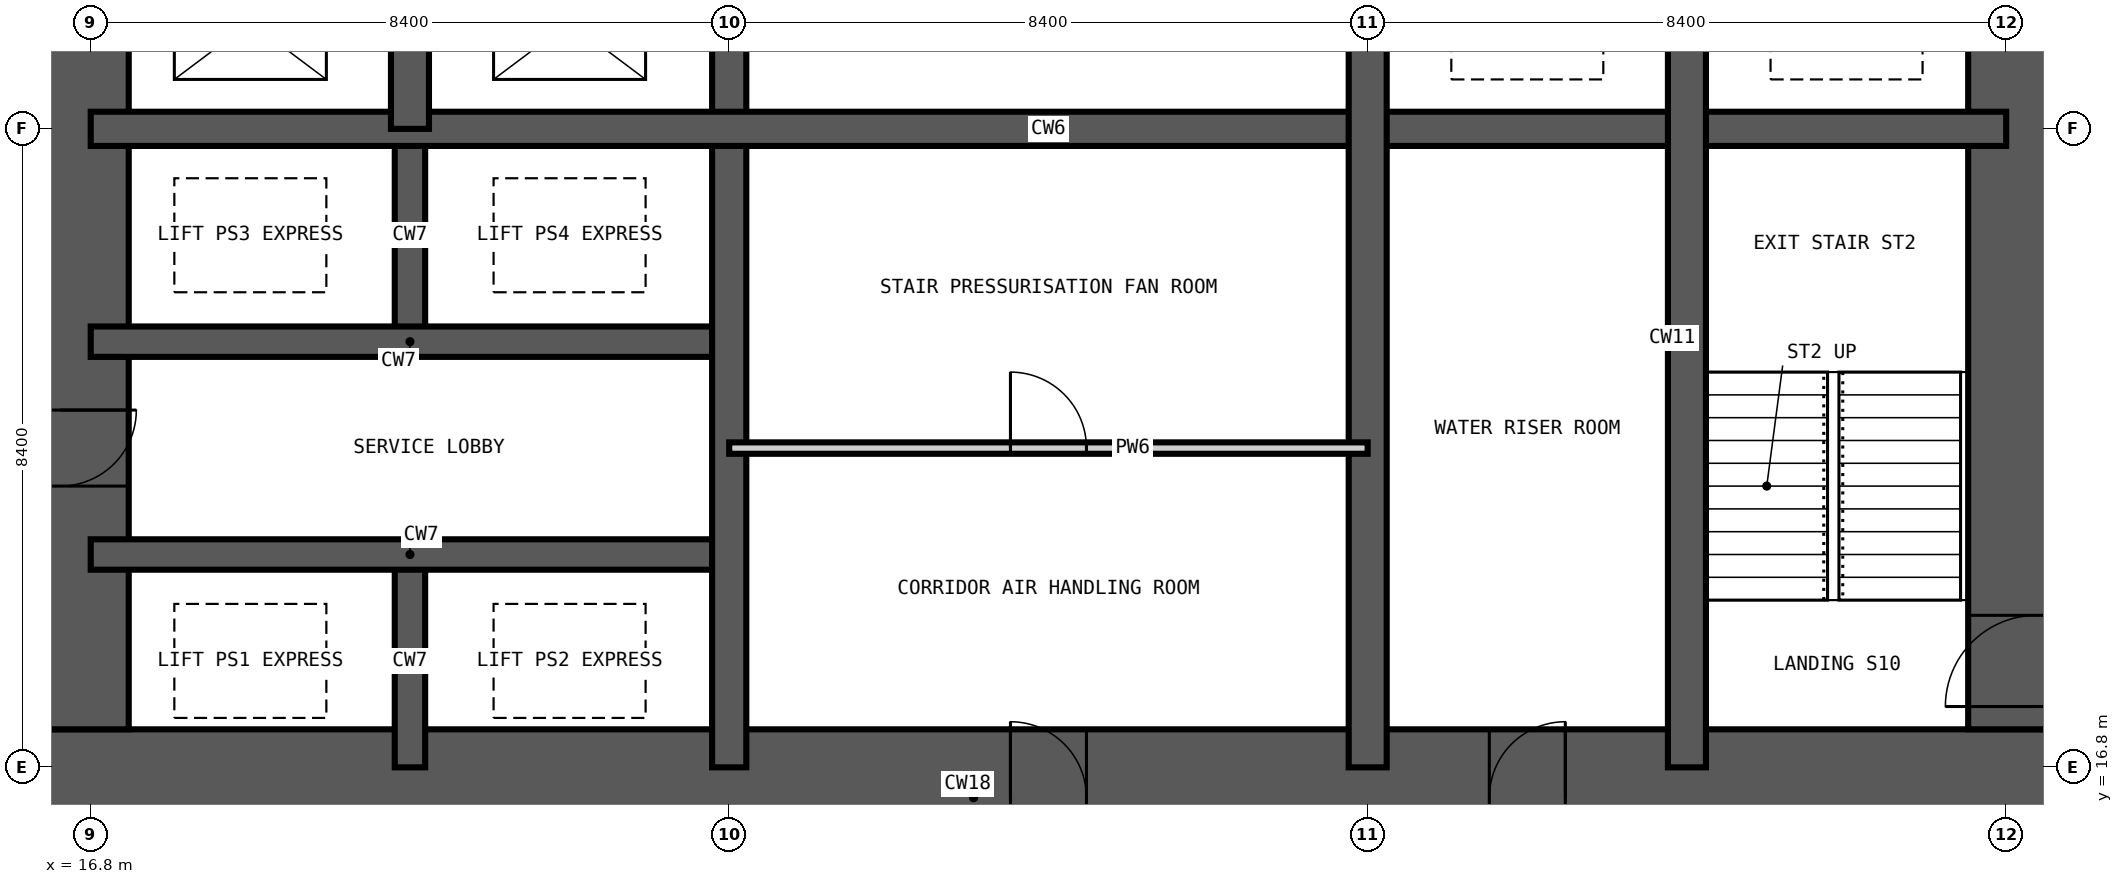
"""IFC4 building model, lengths in metres.
Left out: names, types, materials, properties, quantities, classifications, styles, units other than length and angle.
Written with IfcOpenShell. Run it as: python <this file> out.ifc"""

import sys

from ifc_helpers import new_model, si_unit, direction, frame, frame_2d, origin, place, context, subcontext, project, spatial, rectangle, extrude, element, fill, save


model = new_model("IFC4")
c1 = context("Model", 3, precision=1e-05, world=origin(), true_north=direction((0.0, 1.0)))
c2 = subcontext(c1, "Body", "Model", "MODEL_VIEW")
j1 = project(units=[si_unit("LENGTHUNIT", "METRE"), si_unit("PLANEANGLEUNIT", "RADIAN")], contexts=[c1])
p1 = place(None, origin())
s1 = spatial("IfcSite", under=j1, at=p1, CompositionType="ELEMENT")
p2 = place(p1, origin())
s2 = spatial("IfcBuilding", under=s1, at=p2, CompositionType="ELEMENT")
p3 = place(p2, frame((0.0, 0.0, 30.6)))
s3 = spatial("IfcBuildingStorey", under=s2, at=p3, CompositionType="ELEMENT", Elevation=30.6)
p4 = place(p3, frame((15.5, 16.4, -0.35), z_axis=(0.0, 0.0, 1.0), x_axis=(1.0, 0.0, 0.0)))
e1 = element("IfcWall", 1, at=p4, inside=s3, PredefinedType="SHEAR", context=c2, shape_type="SweptSolid", body=[
    extrude(rectangle(XDim=27.8, YDim=1.8, at=frame_2d((13.9, 0.0))), origin(), (0.0, 0.0, 1.0), 3.6),
])
p5 = place(p4, frame((13.4, 0.0, 0.35)))
e2 = element("IfcOpeningElement", 2, at=p5, cuts=e1, PredefinedType="OPENING", context=c2, shape_type="SweptSolid", body=[
    extrude(rectangle(XDim=1.0, YDim=2.1, at=frame_2d((0.5, 1.05))), frame((0.0, 0.91, 0.0), z_axis=(0.0, -1.0, 0.0), x_axis=(1.0, 0.0, 0.0)), (0.0, 0.0, 1.0), 1.82),
])
p6 = place(p4, frame((19.7, 0.0, 0.35)))
e3 = element("IfcOpeningElement", 3, at=p6, cuts=e1, PredefinedType="OPENING", context=c2, shape_type="SweptSolid", body=[
    extrude(rectangle(XDim=1.0, YDim=2.1, at=frame_2d((0.5, 1.05))), frame((0.0, 0.91, 0.0), z_axis=(0.0, -1.0, 0.0), x_axis=(1.0, 0.0, 0.0)), (0.0, 0.0, 1.0), 1.82),
])
p7 = place(p3, frame((42.4, 17.3, -0.35), z_axis=(0.0, 0.0, 1.0), x_axis=(0.0, 1.0, 0.0)))
e4 = element("IfcWall", 4, at=p7, inside=s3, PredefinedType="SHEAR", context=c2, shape_type="SweptSolid", body=[
    extrude(rectangle(XDim=24.2, YDim=1.8, at=frame_2d((12.1, 0.0))), origin(), (0.0, 0.0, 1.0), 3.6),
])
p8 = place(p7, frame((0.3, 0.0, 0.35)))
e5 = element("IfcOpeningElement", 5, at=p8, cuts=e4, PredefinedType="OPENING", context=c2, shape_type="SweptSolid", body=[
    extrude(rectangle(XDim=1.2, YDim=2.2, at=frame_2d((0.6, 1.1))), frame((0.0, 0.91, 0.0), z_axis=(0.0, -1.0, 0.0), x_axis=(1.0, 0.0, 0.0)), (0.0, 0.0, 1.0), 1.82),
])
p9 = place(p7, frame((11.6, 0.0, 0.35)))
e6 = element("IfcOpeningElement", 6, at=p9, cuts=e4, PredefinedType="OPENING", context=c2, shape_type="SweptSolid", body=[
    extrude(rectangle(XDim=1.0, YDim=2.1, at=frame_2d((0.5, 1.05))), frame((0.0, 0.91, 0.0), z_axis=(0.0, -1.0, 0.0), x_axis=(1.0, 0.0, 0.0)), (0.0, 0.0, 1.0), 1.82),
])
p10 = place(p7, frame((20.0, 0.0, 0.35)))
e7 = element("IfcOpeningElement", 7, at=p10, cuts=e4, PredefinedType="OPENING", context=c2, shape_type="SweptSolid", body=[
    extrude(rectangle(XDim=1.0, YDim=2.1, at=frame_2d((0.5, 1.05))), frame((0.0, 0.91, 0.0), z_axis=(0.0, -1.0, 0.0), x_axis=(1.0, 0.0, 0.0)), (0.0, 0.0, 1.0), 1.82),
])
p11 = place(p3, frame((16.4, 41.5, -0.35), z_axis=(0.0, 0.0, 1.0), x_axis=(0.0, -1.0, 0.0)))
e8 = element("IfcWall", 8, at=p11, inside=s3, PredefinedType="SHEAR", context=c2, shape_type="SweptSolid", body=[
    extrude(rectangle(XDim=24.2, YDim=1.8, at=frame_2d((12.1, 0.0))), origin(), (0.0, 0.0, 1.0), 3.6),
])
p12 = place(p11, frame((11.2, 0.0, 0.35)))
e9 = element("IfcOpeningElement", 9, at=p12, cuts=e8, PredefinedType="OPENING", context=c2, shape_type="SweptSolid", body=[
    extrude(rectangle(XDim=1.8, YDim=2.2, at=frame_2d((0.9, 1.1))), frame((0.0, 0.91, 0.0), z_axis=(0.0, -1.0, 0.0), x_axis=(1.0, 0.0, 0.0)), (0.0, 0.0, 1.0), 1.82),
])
p13 = place(p11, frame((20.0, 0.0, 0.35)))
e10 = element("IfcOpeningElement", 10, at=p13, cuts=e8, PredefinedType="OPENING", context=c2, shape_type="SweptSolid", body=[
    extrude(rectangle(XDim=1.0, YDim=2.1, at=frame_2d((0.5, 1.05))), frame((0.0, 0.91, 0.0), z_axis=(0.0, -1.0, 0.0), x_axis=(1.0, 0.0, 0.0)), (0.0, 0.0, 1.0), 1.82),
])
p14 = place(p11, frame((5.3, 0.0, 0.35)))
e11 = element("IfcOpeningElement", 11, at=p14, cuts=e8, PredefinedType="OPENING", context=c2, shape_type="SweptSolid", body=[
    extrude(rectangle(XDim=1.0, YDim=2.1, at=frame_2d((0.5, 1.05))), frame((0.0, 0.91, 0.0), z_axis=(0.0, -1.0, 0.0), x_axis=(1.0, 0.0, 0.0)), (0.0, 0.0, 1.0), 1.82),
])
for number, where, z_axis, x_axis in (
    (12, (21.0, 16.8, -0.35), (0.0, 0.0, 1.0), (0.0, 1.0, 0.0)),
    (13, (21.0, 22.4, -0.35), (0.0, 0.0, 1.0), (0.0, 1.0, 0.0)),
):
    element("IfcWall", number, at=place(p3, frame(where, z_axis=z_axis, x_axis=x_axis)), inside=s3, PredefinedType="SHEAR", context=c2, shape_type="SweptSolid", body=[
        extrude(rectangle(XDim=2.8, YDim=0.4, at=frame_2d((1.4, 0.0))), origin(), (0.0, 0.0, 1.0), 3.6),
    ])
for number, where, z_axis, x_axis in (
    (14, (16.8, 19.6, -0.35), (0.0, 0.0, 1.0), (1.0, 0.0, 0.0)),
    (15, (16.8, 22.4, -0.35), (0.0, 0.0, 1.0), (1.0, 0.0, 0.0)),
):
    element("IfcWall", number, at=place(p3, frame(where, z_axis=z_axis, x_axis=x_axis)), inside=s3, PredefinedType="SHEAR", context=c2, shape_type="SweptSolid", body=[
        extrude(rectangle(XDim=8.4, YDim=0.4, at=frame_2d((4.2, 0.0))), origin(), (0.0, 0.0, 1.0), 3.6),
    ])
for number, where, z_axis, x_axis in (
    (16, (25.2, 16.8, -0.35), (0.0, 0.0, 1.0), (0.0, 1.0, 0.0)),
    (17, (16.8, 25.2, -0.35), (0.0, 0.0, 1.0), (1.0, 0.0, 0.0)),
):
    element("IfcWall", number, at=place(p3, frame(where, z_axis=z_axis, x_axis=x_axis)), inside=s3, PredefinedType="SHEAR", context=c2, shape_type="SweptSolid", body=[
        extrude(rectangle(XDim=25.2, YDim=0.45, at=frame_2d((12.6, 0.0))), origin(), (0.0, 0.0, 1.0), 3.6),
    ])
p15 = place(p3, frame((21.0, 25.2, -0.35), z_axis=(0.0, 0.0, 1.0), x_axis=(0.0, 1.0, 0.0)))
e18 = element("IfcWall", 18, at=p15, inside=s3, PredefinedType="SHEAR", context=c2, shape_type="SweptSolid", body=[
    extrude(rectangle(XDim=2.8, YDim=0.5, at=frame_2d((1.4, 0.0))), origin(), (0.0, 0.0, 1.0), 3.6),
])
p16 = place(p3, frame((33.6, 16.8, -0.35), z_axis=(0.0, 0.0, 1.0), x_axis=(0.0, 1.0, 0.0)))
e19 = element("IfcWall", 19, at=p16, inside=s3, PredefinedType="SHEAR", context=c2, shape_type="SweptSolid", body=[
    extrude(rectangle(XDim=25.2, YDim=0.5, at=frame_2d((12.6, 0.0))), origin(), (0.0, 0.0, 1.0), 3.6),
])
p17 = place(p16, frame((22.5, 0.0, 0.35)))
e20 = element("IfcOpeningElement", 20, at=p17, cuts=e19, PredefinedType="OPENING", context=c2, shape_type="SweptSolid", body=[
    extrude(rectangle(XDim=1.2, YDim=2.2, at=frame_2d((0.6, 1.1))), frame((0.0, 0.26, 0.0), z_axis=(0.0, -1.0, 0.0), x_axis=(1.0, 0.0, 0.0)), (0.0, 0.0, 1.0), 0.52),
])
p18 = place(p16, frame((18.3, 0.0, 0.35)))
e21 = element("IfcOpeningElement", 21, at=p18, cuts=e19, PredefinedType="OPENING", context=c2, shape_type="SweptSolid", body=[
    extrude(rectangle(XDim=1.2, YDim=2.2, at=frame_2d((0.6, 1.1))), frame((0.0, 0.26, 0.0), z_axis=(0.0, -1.0, 0.0), x_axis=(1.0, 0.0, 0.0)), (0.0, 0.0, 1.0), 0.52),
])
p19 = place(p16, frame((12.1, 0.0, 0.35)))
e22 = element("IfcOpeningElement", 22, at=p19, cuts=e19, PredefinedType="OPENING", context=c2, shape_type="SweptSolid", body=[
    extrude(rectangle(XDim=1.0, YDim=2.1, at=frame_2d((0.5, 1.05))), frame((0.0, 0.26, 0.0), z_axis=(0.0, -1.0, 0.0), x_axis=(1.0, 0.0, 0.0)), (0.0, 0.0, 1.0), 0.52),
])
p20 = place(p3, frame((37.8, 16.8, -0.35), z_axis=(0.0, 0.0, 1.0), x_axis=(0.0, 1.0, 0.0)))
e23 = element("IfcWall", 23, at=p20, inside=s3, PredefinedType="SHEAR", context=c2, shape_type="SweptSolid", body=[
    extrude(rectangle(XDim=11.2, YDim=0.5, at=frame_2d((5.6, 0.0))), origin(), (0.0, 0.0, 1.0), 3.6),
])
p21 = place(p3, frame((25.2, 21.0, 0.0), z_axis=(0.0, 0.0, 1.0), x_axis=(1.0, 0.0, 0.0)))
e24 = element("IfcWall", 24, at=p21, inside=s3, PredefinedType="PARTITIONING", context=c2, shape_type="SweptSolid", body=[
    extrude(rectangle(XDim=8.4, YDim=0.15, at=frame_2d((4.2, 0.0))), origin(), (0.0, 0.0, 1.0), 3.25),
])
p22 = place(p21, frame((3.7, 0.0, 0.0)))
e25 = element("IfcOpeningElement", 25, at=p22, cuts=e24, PredefinedType="OPENING", context=c2, shape_type="SweptSolid", body=[
    extrude(rectangle(XDim=1.0, YDim=2.1, at=frame_2d((0.5, 1.05))), frame((0.0, 0.085, 0.0), z_axis=(0.0, -1.0, 0.0), x_axis=(1.0, 0.0, 0.0)), (0.0, 0.0, 1.0), 0.17),
])
p23 = place(p8, origin())
e26 = element("IfcDoor", 26, at=p23, inside=s3, OperationType="SINGLE_SWING_LEFT", PredefinedType="DOOR", context=c2, shape_type="SweptSolid", body=[
    extrude(rectangle(XDim=1.2, YDim=2.2, at=frame_2d((0.6, 1.1))), frame((0.0, 0.025, 0.0), z_axis=(0.0, -1.0, 0.0), x_axis=(1.0, 0.0, 0.0)), (0.0, 0.0, 1.0), 0.05),
])
fill(e5, e26)
p24 = place(p13, origin())
e27 = element("IfcDoor", 27, at=p24, inside=s3, OperationType="SINGLE_SWING_LEFT", PredefinedType="DOOR", context=c2, shape_type="SweptSolid", body=[
    extrude(rectangle(XDim=1.0, YDim=2.1, at=frame_2d((0.5, 1.05))), frame((0.0, 0.025, 0.0), z_axis=(0.0, -1.0, 0.0), x_axis=(1.0, 0.0, 0.0)), (0.0, 0.0, 1.0), 0.05),
])
fill(e10, e27)
p25 = place(p5, origin())
e28 = element("IfcDoor", 28, at=p25, inside=s3, OperationType="SINGLE_SWING_LEFT", PredefinedType="DOOR", context=c2, shape_type="SweptSolid", body=[
    extrude(rectangle(XDim=1.0, YDim=2.1, at=frame_2d((0.5, 1.05))), frame((0.0, 0.025, 0.0), z_axis=(0.0, -1.0, 0.0), x_axis=(1.0, 0.0, 0.0)), (0.0, 0.0, 1.0), 0.05),
])
fill(e2, e28)
p26 = place(p22, origin())
e29 = element("IfcDoor", 29, at=p26, inside=s3, OperationType="SINGLE_SWING_LEFT", PredefinedType="DOOR", context=c2, shape_type="SweptSolid", body=[
    extrude(rectangle(XDim=1.0, YDim=2.1, at=frame_2d((0.5, 1.05))), frame((0.0, 0.025, 0.0), z_axis=(0.0, -1.0, 0.0), x_axis=(1.0, 0.0, 0.0)), (0.0, 0.0, 1.0), 0.05),
])
fill(e25, e29)
p27 = place(p6, origin())
e30 = element("IfcDoor", 30, at=p27, inside=s3, OperationType="SINGLE_SWING_RIGHT", PredefinedType="DOOR", context=c2, shape_type="SweptSolid", body=[
    extrude(rectangle(XDim=1.0, YDim=2.1, at=frame_2d((0.5, 1.05))), frame((0.0, 0.025, 0.0), z_axis=(0.0, -1.0, 0.0), x_axis=(1.0, 0.0, 0.0)), (0.0, 0.0, 1.0), 0.05),
])
fill(e3, e30)
save(model, sys.argv[1])
